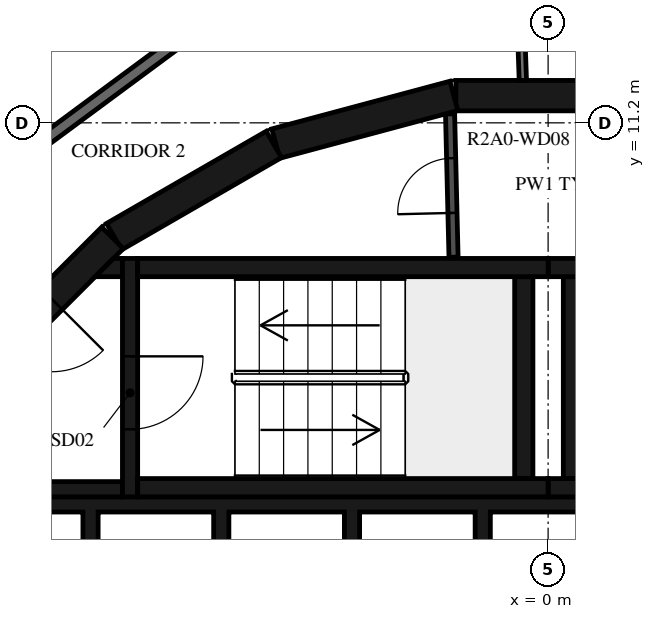
"""IFC4 building model, lengths in metres.
Left out: names, types, materials, properties, quantities, classifications, styles, units other than length and angle.
Written with IfcOpenShell. Run it as: python <this file> out.ifc"""

import sys

from ifc_helpers import new_model, si_unit, direction, frame, frame_2d, origin, place, context, subcontext, project, spatial, polyline, rectangle, outline, extrude, element, fill, save


model = new_model("IFC4")
c1 = context("Model", 3, precision=1e-05, world=origin(), true_north=direction((0.0, 1.0)))
c2 = subcontext(c1, "Body", "Model", "MODEL_VIEW")
j1 = project(units=[si_unit("LENGTHUNIT", "METRE"), si_unit("PLANEANGLEUNIT", "RADIAN")], contexts=[c1])
p1 = place(None, origin())
s1 = spatial("IfcSite", under=j1, at=p1, CompositionType="ELEMENT")
p2 = place(p1, origin())
s2 = spatial("IfcBuilding", under=s1, at=p2, CompositionType="ELEMENT")
p3 = place(p2, frame((0.0, 0.0, 83.7)))
s3 = spatial("IfcBuildingStorey", under=s2, at=p3, CompositionType="ELEMENT", Elevation=83.7)
for number, where, z_axis, x_axis in (
    (1, (1.516, 11.647, 0.0), (0.0, 0.0, 1.0), (-1.0, 0.0, 0.0)),
    (2, (-1.55, 11.643, 0.0), (0.0, 0.0, 1.0), (-0.966, -0.259, 0.0)),
    (3, (-4.51, 10.845, 0.0), (0.0, 0.0, 1.0), (-0.866, -0.5, 0.0)),
):
    element("IfcWall", number, at=place(p3, frame(where, z_axis=z_axis, x_axis=x_axis)), inside=s3, PredefinedType="SHEAR", context=c2, shape_type="SweptSolid", body=[
        extrude(rectangle(XDim=3.033, YDim=0.5, at=frame_2d((1.516, 0.0))), origin(), (0.0, 0.0, 1.0), 3.12),
    ])
p4 = place(p3, frame((-7.164, 9.308, 0.0), z_axis=(0.0, 0.0, 1.0), x_axis=(-0.707106781187, -0.707106781187, 0.0)))
e4 = element("IfcWall", 4, at=p4, inside=s3, PredefinedType="SHEAR", context=c2, shape_type="SweptSolid", body=[
    extrude(rectangle(XDim=3.032, YDim=0.5, at=frame_2d((1.516, 0.0))), origin(), (0.0, 0.0, 1.0), 3.12),
])
p5 = place(p4, frame((1.416, 0.0, 0.0)))
e5 = element("IfcOpeningElement", 5, at=p5, cuts=e4, PredefinedType="OPENING", context=c2, shape_type="SweptSolid", body=[
    extrude(rectangle(XDim=1.2, YDim=2.1, at=frame_2d((0.6, 1.05))), frame((0.0, 0.26, 0.0), z_axis=(0.0, -1.0, 0.0), x_axis=(1.0, 0.0, 0.0)), (0.0, 0.0, 1.0), 0.52),
])
for number, where, z_axis, x_axis in (
    (6, (0.0, 5.2, 0.0), (0.0, 0.0, 1.0), (1.0, 0.0, 0.0)),
    (7, (0.0, 8.82, 0.0), (0.0, 0.0, 1.0), (1.0, 0.0, 0.0)),
):
    element("IfcWall", number, at=place(p3, frame(where, z_axis=z_axis, x_axis=x_axis)), inside=s3, PredefinedType="SHEAR", context=c2, shape_type="SweptSolid", body=[
        extrude(rectangle(XDim=6.75, YDim=0.3, at=frame_2d((3.375, 0.0))), origin(), (0.0, 0.0, 1.0), 3.12),
    ])
p6 = place(p3, frame((0.4, 5.35, 0.0), z_axis=(0.0, 0.0, 1.0), x_axis=(0.0, 1.0, 0.0)))
e8 = element("IfcWall", 8, at=p6, inside=s3, PredefinedType="SHEAR", context=c2, shape_type="SweptSolid", body=[
    extrude(rectangle(XDim=3.32, YDim=0.3, at=frame_2d((1.66, 0.0))), origin(), (0.0, 0.0, 1.0), 3.12),
])
for number, where, z_axis, x_axis in (
    (9, (-6.75, 5.2, 0.0), (0.0, 0.0, 1.0), (1.0, 0.0, 0.0)),
    (10, (-6.75, 8.82, 0.0), (0.0, 0.0, 1.0), (1.0, 0.0, 0.0)),
):
    element("IfcWall", number, at=place(p3, frame(where, z_axis=z_axis, x_axis=x_axis)), inside=s3, PredefinedType="SHEAR", context=c2, shape_type="SweptSolid", body=[
        extrude(rectangle(XDim=6.75, YDim=0.3, at=frame_2d((3.375, 0.0))), origin(), (0.0, 0.0, 1.0), 3.12),
    ])
p7 = place(p3, frame((-0.4, 5.35, 0.0), z_axis=(0.0, 0.0, 1.0), x_axis=(0.0, 1.0, 0.0)))
e11 = element("IfcWall", 11, at=p7, inside=s3, PredefinedType="SHEAR", context=c2, shape_type="SweptSolid", body=[
    extrude(rectangle(XDim=3.32, YDim=0.3, at=frame_2d((1.66, 0.0))), origin(), (0.0, 0.0, 1.0), 3.12),
])
p8 = place(p3, frame((-6.875, 8.97, 0.0), z_axis=(0.0, 0.0, 1.0), x_axis=(0.0, -1.0, 0.0)))
e12 = element("IfcWall", 12, at=p8, inside=s3, PredefinedType="SHEAR", context=c2, shape_type="SweptSolid", body=[
    extrude(rectangle(XDim=3.92, YDim=0.25, at=frame_2d((1.96, 0.0))), origin(), (0.0, 0.0, 1.0), 3.12),
])
p9 = place(p8, frame((1.61, 0.0, 0.0)))
e13 = element("IfcOpeningElement", 13, at=p9, cuts=e12, PredefinedType="OPENING", context=c2, shape_type="SweptSolid", body=[
    extrude(rectangle(XDim=1.2, YDim=2.1, at=frame_2d((0.6, 1.05))), frame((0.0, 0.135, 0.0), z_axis=(0.0, -1.0, 0.0), x_axis=(1.0, 0.0, 0.0)), (0.0, 0.0, 1.0), 0.27),
])
p10 = place(p3, frame((-7.0, 5.175, 0.0), z_axis=(0.0, 0.0, 1.0), x_axis=(-1.0, 0.0, 0.0)))
e14 = element("IfcWall", 14, at=p10, inside=s3, PredefinedType="SHEAR", context=c2, shape_type="SweptSolid", body=[
    extrude(rectangle(XDim=3.1, YDim=0.25, at=frame_2d((1.55, 0.0))), origin(), (0.0, 0.0, 1.0), 3.12),
])
p11 = place(p3, origin())
e15 = element("IfcWall", 15, at=p11, inside=s3, PredefinedType="SHEAR", context=c2, shape_type="SweptSolid", body=[
    extrude(outline(polyline([(-7.148, 8.97), (-7.0, 8.97), (-7.0, 8.67), (-7.448, 8.67), (-7.148, 8.97)])), origin(), (0.0, 0.0, 1.0), 3.12),
])
p12 = place(p3, origin())
e16 = element("IfcWall", 16, at=p12, inside=s3, PredefinedType="SHEAR", context=c2, shape_type="SweptSolid", body=[
    extrude(outline(polyline([(-9.55, 4.8), (-7.65, 4.8), (-7.65, 1.9), (-7.4, 1.9), (-7.4, 4.8), (-5.5, 4.8), (-5.5, 1.9), (-5.25, 1.9), (-5.25, 4.8), (-3.35, 4.8), (-3.35, 1.9), (-3.1, 1.9), (-3.1, 4.8), (-1.2, 4.8), (-1.2, 1.9), (-0.95, 1.9), (-0.95, 4.8), (3.1, 4.8), (3.1, 1.9), (3.35, 1.9), (3.35, 4.8), (5.25, 4.8), (5.25, 1.9), (5.5, 1.9), (5.5, 4.8), (7.4, 4.8), (7.4, 1.9), (7.65, 1.9), (7.65, 4.8), (9.55, 4.8), (9.55, 1.9), (9.8, 1.9), (9.8, 4.8), (9.8, 5.05), (-9.8, 5.05), (-9.8, 4.8), (-9.8, 1.9), (-9.55, 1.9), (-9.55, 4.8)])), origin(), (0.0, 0.0, 1.0), 3.12),
])
p13 = place(p3, frame((-1.555, 8.99, 0.0), z_axis=(0.0, 0.0, 1.0), x_axis=(-0.024125549686, 0.999708936567, 0.0)))
e17 = element("IfcWall", 17, at=p13, inside=s3, PredefinedType="PARTITIONING", context=c2, shape_type="SweptSolid", body=[
    extrude(rectangle(XDim=2.358, YDim=0.15, at=frame_2d((1.179, 0.0))), origin(), (0.0, 0.0, 1.0), 3.12),
])
p14 = place(p13, frame((0.729, 0.0, 0.0)))
e18 = element("IfcOpeningElement", 18, at=p14, cuts=e17, PredefinedType="OPENING", context=c2, shape_type="SweptSolid", body=[
    extrude(rectangle(XDim=0.9, YDim=2.1, at=frame_2d((0.45, 1.05))), frame((0.0, 0.085, 0.0), z_axis=(0.0, -1.0, 0.0), x_axis=(1.0, 0.0, 0.0)), (0.0, 0.0, 1.0), 0.17),
])
p15 = place(p3, frame((-0.479, 13.734, 0.0), z_axis=(0.0, 0.0, 1.0), x_axis=(0.034805430832, -0.999394107439, 0.0)))
e19 = element("IfcWall", 19, at=p15, inside=s3, PredefinedType="PARTITIONING", context=c2, shape_type="SweptSolid", body=[
    extrude(rectangle(XDim=1.838, YDim=0.12, at=frame_2d((0.919, 0.0))), origin(), (0.0, 0.0, 1.0), 3.12),
])
p16 = place(p15, frame((0.115, 0.0, 0.0)))
e20 = element("IfcOpeningElement", 20, at=p16, cuts=e19, PredefinedType="OPENING", context=c2, shape_type="SweptSolid", body=[
    extrude(rectangle(XDim=1.2, YDim=2.1, at=frame_2d((0.6, 1.05))), frame((0.0, 0.07, 0.0), z_axis=(0.0, -1.0, 0.0), x_axis=(1.0, 0.0, 0.0)), (0.0, 0.0, 1.0), 0.14),
])
p17 = place(p3, frame((-5.198, 13.196, 0.0), z_axis=(0.0, 0.0, 1.0), x_axis=(-0.803869883159, -0.594805187394, 0.0)))
e21 = element("IfcWall", 21, at=p17, inside=s3, PredefinedType="STANDARD", context=c2, shape_type="SweptSolid", body=[
    extrude(rectangle(XDim=7.342, YDim=0.2, at=frame_2d((3.671, 0.0))), origin(), (0.0, 0.0, 1.0), 3.12),
])
p18 = place(p17, frame((5.8, 0.0, 0.0)))
e22 = element("IfcOpeningElement", 22, at=p18, cuts=e21, PredefinedType="OPENING", context=c2, shape_type="SweptSolid", body=[
    extrude(rectangle(XDim=1.0, YDim=2.1, at=frame_2d((0.5, 1.05))), frame((0.0, 0.11, 0.0), z_axis=(0.0, -1.0, 0.0), x_axis=(1.0, 0.0, 0.0)), (0.0, 0.0, 1.0), 0.22),
])
p19 = place(p3, frame((-5.767, 14.641, 0.0), z_axis=(0.0, 0.0, 1.0), x_axis=(-0.803853364238, -0.594827511807, 0.0)))
e23 = element("IfcWall", 23, at=p19, inside=s3, PredefinedType="PARTITIONING", context=c2, shape_type="SweptSolid", body=[
    extrude(rectangle(XDim=8.146, YDim=0.12, at=frame_2d((4.073, 0.0))), origin(), (0.0, 0.0, 1.0), 3.12),
])
p20 = place(p19, frame((0.97, 0.0, 0.0)))
e24 = element("IfcOpeningElement", 24, at=p20, cuts=e23, PredefinedType="OPENING", context=c2, shape_type="SweptSolid", body=[
    extrude(rectangle(XDim=0.8, YDim=2.1, at=frame_2d((0.4, 1.05))), frame((0.0, 0.07, 0.0), z_axis=(0.0, -1.0, 0.0), x_axis=(1.0, 0.0, 0.0)), (0.0, 0.0, 1.0), 0.14),
])
p21 = place(p3, frame((-5.952, 23.571, 0.0), z_axis=(0.0, 0.0, 1.0), x_axis=(-0.398745097158, -0.917061801348, 0.0)))
e25 = element("IfcWall", 25, at=p21, inside=s3, PredefinedType="PARTITIONING", context=c2, shape_type="SweptSolid", body=[
    extrude(rectangle(XDim=14.576, YDim=0.12, at=frame_2d((7.288, 0.0))), origin(), (0.0, 0.0, 1.0), 3.12),
])
p22 = place(p21, frame((2.801, 0.0, 0.0)))
e26 = element("IfcOpeningElement", 26, at=p22, cuts=e25, PredefinedType="OPENING", context=c2, shape_type="SweptSolid", body=[
    extrude(rectangle(XDim=0.9, YDim=2.1, at=frame_2d((0.45, 1.05))), frame((0.0, 0.07, 0.0), z_axis=(0.0, -1.0, 0.0), x_axis=(1.0, 0.0, 0.0)), (0.0, 0.0, 1.0), 0.14),
])
p23 = place(p21, frame((1.405, 0.0, 0.0)))
e27 = element("IfcOpeningElement", 27, at=p23, cuts=e25, PredefinedType="OPENING", context=c2, shape_type="SweptSolid", body=[
    extrude(rectangle(XDim=0.9, YDim=2.1, at=frame_2d((0.45, 1.05))), frame((0.0, 0.07, 0.0), z_axis=(0.0, -1.0, 0.0), x_axis=(1.0, 0.0, 0.0)), (0.0, 0.0, 1.0), 0.14),
])
p24 = place(p9, origin())
e28 = element("IfcDoor", 28, at=p24, inside=s3, OperationType="SINGLE_SWING_LEFT", PredefinedType="DOOR", context=c2, shape_type="SweptSolid", body=[
    extrude(rectangle(XDim=1.2, YDim=2.1, at=frame_2d((0.6, 1.05))), frame((0.0, 0.025, 0.0), z_axis=(0.0, -1.0, 0.0), x_axis=(1.0, 0.0, 0.0)), (0.0, 0.0, 1.0), 0.05),
])
fill(e13, e28)
p25 = place(p5, origin())
e29 = element("IfcDoor", 29, at=p25, inside=s3, OperationType="SINGLE_SWING_RIGHT", PredefinedType="DOOR", context=c2, shape_type="SweptSolid", body=[
    extrude(rectangle(XDim=1.2, YDim=2.1, at=frame_2d((0.6, 1.05))), frame((0.0, 0.025, 0.0), z_axis=(0.0, -1.0, 0.0), x_axis=(1.0, 0.0, 0.0)), (0.0, 0.0, 1.0), 0.05),
])
fill(e5, e29)
p26 = place(p14, origin())
e30 = element("IfcDoor", 30, at=p26, inside=s3, OperationType="SINGLE_SWING_LEFT", PredefinedType="DOOR", context=c2, shape_type="SweptSolid", body=[
    extrude(rectangle(XDim=0.9, YDim=2.1, at=frame_2d((0.45, 1.05))), frame((0.0, 0.025, 0.0), z_axis=(0.0, -1.0, 0.0), x_axis=(1.0, 0.0, 0.0)), (0.0, 0.0, 1.0), 0.05),
])
fill(e18, e30)
save(model, sys.argv[1])
